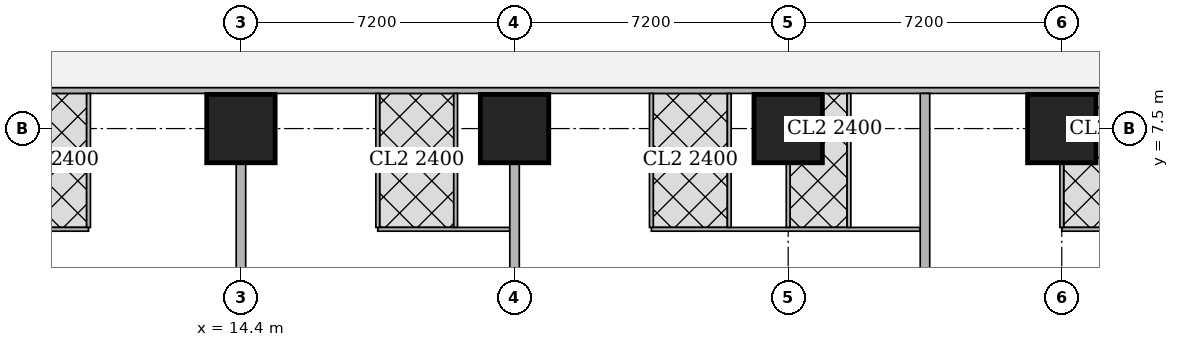
"""IFC4 building model, lengths in metres.
Left out: names, types, materials, properties, quantities, classifications, styles, units other than length and angle.
Written with IfcOpenShell. Run it as: python <this file> out.ifc"""

import sys

from ifc_helpers import new_model, si_unit, direction, frame, frame_2d, origin, origin_2d, place, context, subcontext, project, spatial, rectangle, extrude, element, fill, save


model = new_model("IFC4")
c1 = context("Model", 3, precision=1e-05, world=origin(), true_north=direction((0.0, 1.0)))
c2 = subcontext(c1, "Body", "Model", "MODEL_VIEW")
j1 = project(units=[si_unit("LENGTHUNIT", "METRE"), si_unit("PLANEANGLEUNIT", "RADIAN")], contexts=[c1])
p1 = place(None, origin())
s1 = spatial("IfcSite", under=j1, at=p1, CompositionType="ELEMENT")
p2 = place(p1, origin())
s2 = spatial("IfcBuilding", under=s1, at=p2, CompositionType="ELEMENT")
p3 = place(p2, frame((0.0, 0.0, 20.0)))
s3 = spatial("IfcBuildingStorey", under=s2, at=p3, CompositionType="ELEMENT", Elevation=20.0)
for number, where, z_axis, x_axis in (
    (1, (14.4, 7.5, 0.0), (0.0, 0.0, 1.0), (1.0, 0.0, 0.0)),
    (2, (21.6, 7.5, 0.0), (0.0, 0.0, 1.0), (1.0, 0.0, 0.0)),
    (3, (28.8, 7.5, 0.0), (0.0, 0.0, 1.0), (1.0, 0.0, 0.0)),
    (4, (36.0, 7.5, 0.0), (0.0, 0.0, 1.0), (1.0, 0.0, 0.0)),
):
    element("IfcColumn", number, at=place(p3, frame(where, z_axis=z_axis, x_axis=x_axis)), inside=s3, PredefinedType="COLUMN", context=c2, shape_type="SweptSolid", body=[
        extrude(rectangle(XDim=1.8, YDim=1.8, at=origin_2d()), origin(), (0.0, 0.0, 1.0), 3.75),
    ])
p4 = place(p3, frame((40.054, 8.5, 0.0), z_axis=(0.0, 0.0, 1.0), x_axis=(-1.0, 0.0, 0.0)))
e5 = element("IfcWall", 5, at=p4, inside=s3, PredefinedType="SOLIDWALL", context=c2, shape_type="SweptSolid", body=[
    extrude(rectangle(XDim=31.704, YDim=0.15, at=frame_2d((15.852, 0.0))), origin(), (0.0, 0.0, 1.0), 3.5),
])
p5 = place(p4, frame((27.321, 0.0, 0.0)))
e6 = element("IfcOpeningElement", 6, at=p5, cuts=e5, PredefinedType="OPENING", context=c2, shape_type="SweptSolid", body=[
    extrude(rectangle(XDim=1.0, YDim=2.1, at=frame_2d((0.5, 1.05))), frame((0.0, 0.085, 0.0), z_axis=(0.0, -1.0, 0.0), x_axis=(1.0, 0.0, 0.0)), (0.0, 0.0, 1.0), 0.17),
])
p6 = place(p4, frame((23.054, 0.0, 0.0)))
e7 = element("IfcOpeningElement", 7, at=p6, cuts=e5, PredefinedType="OPENING", context=c2, shape_type="SweptSolid", body=[
    extrude(rectangle(XDim=1.0, YDim=2.1, at=frame_2d((0.5, 1.05))), frame((0.0, 0.085, 0.0), z_axis=(0.0, -1.0, 0.0), x_axis=(1.0, 0.0, 0.0)), (0.0, 0.0, 1.0), 0.17),
])
p7 = place(p4, frame((15.754, 0.0, 0.0)))
e8 = element("IfcOpeningElement", 8, at=p7, cuts=e5, PredefinedType="OPENING", context=c2, shape_type="SweptSolid", body=[
    extrude(rectangle(XDim=1.0, YDim=2.1, at=frame_2d((0.5, 1.05))), frame((0.0, 0.085, 0.0), z_axis=(0.0, -1.0, 0.0), x_axis=(1.0, 0.0, 0.0)), (0.0, 0.0, 1.0), 0.17),
])
p8 = place(p4, frame((5.754, 0.0, 0.0)))
e9 = element("IfcOpeningElement", 9, at=p8, cuts=e5, PredefinedType="OPENING", context=c2, shape_type="SweptSolid", body=[
    extrude(rectangle(XDim=1.0, YDim=2.1, at=frame_2d((0.5, 1.05))), frame((0.0, 0.085, 0.0), z_axis=(0.0, -1.0, 0.0), x_axis=(1.0, 0.0, 0.0)), (0.0, 0.0, 1.0), 0.17),
])
p9 = place(p3, frame((33.755, 42.325, 0.0), z_axis=(0.0, 0.0, 1.0), x_axis=(0.185611461091, -0.982623216453, 0.0)))
e10 = element("IfcWall", 10, at=p9, inside=s3, PredefinedType="SOLIDWALL", context=c2, shape_type="SweptSolid", body=[
    extrude(rectangle(XDim=40.241, YDim=0.15, at=frame_2d((20.121, 0.0))), origin(), (0.0, 0.0, 1.0), 2.5),
])
p10 = place(p9, frame((7.325, 0.0, 0.0)))
e11 = element("IfcOpeningElement", 11, at=p10, cuts=e10, PredefinedType="OPENING", context=c2, shape_type="SweptSolid", body=[
    extrude(rectangle(XDim=1.0, YDim=2.1, at=frame_2d((0.5, 1.05))), frame((0.0, 0.085, 0.0), z_axis=(0.0, -1.0, 0.0), x_axis=(1.0, 0.0, 0.0)), (0.0, 0.0, 1.0), 0.17),
])
p11 = place(p9, frame((11.902, 0.0, 0.0)))
e12 = element("IfcOpeningElement", 12, at=p11, cuts=e10, PredefinedType="OPENING", context=c2, shape_type="SweptSolid", body=[
    extrude(rectangle(XDim=1.0, YDim=2.1, at=frame_2d((0.5, 1.05))), frame((0.0, 0.085, 0.0), z_axis=(0.0, -1.0, 0.0), x_axis=(1.0, 0.0, 0.0)), (0.0, 0.0, 1.0), 0.17),
])
p12 = place(p9, frame((25.718, 0.0, 0.0)))
e13 = element("IfcOpeningElement", 13, at=p12, cuts=e10, PredefinedType="OPENING", context=c2, shape_type="SweptSolid", body=[
    extrude(rectangle(XDim=1.0, YDim=2.1, at=frame_2d((0.5, 1.05))), frame((0.0, 0.085, 0.0), z_axis=(0.0, -1.0, 0.0), x_axis=(1.0, 0.0, 0.0)), (0.0, 0.0, 1.0), 0.17),
])
p13 = place(p9, frame((31.788, 0.0, 0.0)))
e14 = element("IfcOpeningElement", 14, at=p13, cuts=e10, PredefinedType="OPENING", context=c2, shape_type="SweptSolid", body=[
    extrude(rectangle(XDim=1.0, YDim=2.1, at=frame_2d((0.5, 1.05))), frame((0.0, 0.085, 0.0), z_axis=(0.0, -1.0, 0.0), x_axis=(1.0, 0.0, 0.0)), (0.0, 0.0, 1.0), 0.17),
])
p14 = place(p3, frame((10.39, 4.85, 0.0), z_axis=(0.0, 0.0, 1.0), x_axis=(-1.0, 0.0, 0.0)))
e15 = element("IfcWall", 15, at=p14, inside=s3, PredefinedType="PARTITIONING", context=c2, shape_type="SweptSolid", body=[
    extrude(rectangle(XDim=1.815, YDim=0.1, at=frame_2d((0.907, 0.0))), origin(), (0.0, 0.0, 1.0), 3.5),
])
p15 = place(p14, frame((0.49, 0.0, 0.0)))
e16 = element("IfcOpeningElement", 16, at=p15, cuts=e15, PredefinedType="OPENING", context=c2, shape_type="SweptSolid", body=[
    extrude(rectangle(XDim=0.9, YDim=2.1, at=frame_2d((0.45, 1.05))), frame((0.0, 0.06, 0.0), z_axis=(0.0, -1.0, 0.0), x_axis=(1.0, 0.0, 0.0)), (0.0, 0.0, 1.0), 0.12),
])
p16 = place(p3, frame((10.39, 4.9, 0.0), z_axis=(0.0, 0.0, 1.0), x_axis=(0.0, 1.0, 0.0)))
e17 = element("IfcWall", 17, at=p16, inside=s3, PredefinedType="PARTITIONING", context=c2, shape_type="SweptSolid", body=[
    extrude(rectangle(XDim=3.525, YDim=0.1, at=frame_2d((1.763, 0.0))), origin(), (0.0, 0.0, 1.0), 3.5),
])
p17 = place(p3, frame((21.475, 4.85, 0.0), z_axis=(0.0, 0.0, 1.0), x_axis=(-1.0, 0.0, 0.0)))
e18 = element("IfcWall", 18, at=p17, inside=s3, PredefinedType="PARTITIONING", context=c2, shape_type="SweptSolid", body=[
    extrude(rectangle(XDim=3.475, YDim=0.1, at=frame_2d((1.738, 0.0))), origin(), (0.0, 0.0, 1.0), 3.5),
])
p18 = place(p17, frame((2.0, 0.0, 0.0)))
e19 = element("IfcOpeningElement", 19, at=p18, cuts=e18, PredefinedType="OPENING", context=c2, shape_type="SweptSolid", body=[
    extrude(rectangle(XDim=0.9, YDim=2.1, at=frame_2d((0.45, 1.05))), frame((0.0, 0.06, 0.0), z_axis=(0.0, -1.0, 0.0), x_axis=(1.0, 0.0, 0.0)), (0.0, 0.0, 1.0), 0.12),
])
p19 = place(p17, frame((0.2, 0.0, 0.0)))
e20 = element("IfcOpeningElement", 20, at=p19, cuts=e18, PredefinedType="OPENING", context=c2, shape_type="SweptSolid", body=[
    extrude(rectangle(XDim=0.9, YDim=2.1, at=frame_2d((0.45, 1.05))), frame((0.0, 0.06, 0.0), z_axis=(0.0, -1.0, 0.0), x_axis=(1.0, 0.0, 0.0)), (0.0, 0.0, 1.0), 0.12),
])
for number, where, z_axis, x_axis in (
    (21, (18.0, 4.9, 0.0), (0.0, 0.0, 1.0), (0.0, 1.0, 0.0)),
    (22, (20.05, 4.9, 0.0), (0.0, 0.0, 1.0), (0.0, 1.0, 0.0)),
):
    element("IfcWall", number, at=place(p3, frame(where, z_axis=z_axis, x_axis=x_axis)), inside=s3, PredefinedType="PARTITIONING", context=c2, shape_type="SweptSolid", body=[
        extrude(rectangle(XDim=3.525, YDim=0.1, at=frame_2d((1.763, 0.0))), origin(), (0.0, 0.0, 1.0), 3.5),
    ])
p20 = place(p3, frame((14.4, 3.65, 0.0), z_axis=(0.0, 0.0, 1.0), x_axis=(0.0, 1.0, 0.0)))
e23 = element("IfcWall", 23, at=p20, inside=s3, PredefinedType="SOLIDWALL", context=c2, shape_type="SweptSolid", body=[
    extrude(rectangle(XDim=2.949, YDim=0.25, at=frame_2d((1.475, 0.0))), origin(), (0.0, 0.0, 1.0), 3.5),
])
p21 = place(p3, frame((32.275, 4.85, 0.0), z_axis=(0.0, 0.0, 1.0), x_axis=(-1.0, 0.0, 0.0)))
e24 = element("IfcWall", 24, at=p21, inside=s3, PredefinedType="PARTITIONING", context=c2, shape_type="SweptSolid", body=[
    extrude(rectangle(XDim=7.075, YDim=0.1, at=frame_2d((3.538, 0.0))), origin(), (0.0, 0.0, 1.0), 3.5),
])
p22 = place(p21, frame((5.6, 0.0, 0.0)))
e25 = element("IfcOpeningElement", 25, at=p22, cuts=e24, PredefinedType="OPENING", context=c2, shape_type="SweptSolid", body=[
    extrude(rectangle(XDim=0.9, YDim=2.1, at=frame_2d((0.45, 1.05))), frame((0.0, 0.06, 0.0), z_axis=(0.0, -1.0, 0.0), x_axis=(1.0, 0.0, 0.0)), (0.0, 0.0, 1.0), 0.12),
])
p23 = place(p21, frame((2.225, 0.0, 0.0)))
e26 = element("IfcOpeningElement", 26, at=p23, cuts=e24, PredefinedType="OPENING", context=c2, shape_type="SweptSolid", body=[
    extrude(rectangle(XDim=0.9, YDim=2.1, at=frame_2d((0.45, 1.05))), frame((0.0, 0.06, 0.0), z_axis=(0.0, -1.0, 0.0), x_axis=(1.0, 0.0, 0.0)), (0.0, 0.0, 1.0), 0.12),
])
p24 = place(p21, frame((3.8, 0.0, 0.0)))
e27 = element("IfcOpeningElement", 27, at=p24, cuts=e24, PredefinedType="OPENING", context=c2, shape_type="SweptSolid", body=[
    extrude(rectangle(XDim=0.9, YDim=2.1, at=frame_2d((0.45, 1.05))), frame((0.0, 0.06, 0.0), z_axis=(0.0, -1.0, 0.0), x_axis=(1.0, 0.0, 0.0)), (0.0, 0.0, 1.0), 0.12),
])
p25 = place(p21, frame((0.425, 0.0, 0.0)))
e28 = element("IfcOpeningElement", 28, at=p25, cuts=e24, PredefinedType="OPENING", context=c2, shape_type="SweptSolid", body=[
    extrude(rectangle(XDim=0.9, YDim=2.1, at=frame_2d((0.45, 1.05))), frame((0.0, 0.06, 0.0), z_axis=(0.0, -1.0, 0.0), x_axis=(1.0, 0.0, 0.0)), (0.0, 0.0, 1.0), 0.12),
])
p26 = place(p3, frame((25.2, 4.9, 0.0), z_axis=(0.0, 0.0, 1.0), x_axis=(0.0, 1.0, 0.0)))
e29 = element("IfcWall", 29, at=p26, inside=s3, PredefinedType="PARTITIONING", context=c2, shape_type="SweptSolid", body=[
    extrude(rectangle(XDim=3.525, YDim=0.1, at=frame_2d((1.763, 0.0))), origin(), (0.0, 0.0, 1.0), 3.5),
])
p27 = place(p3, frame((28.8, 4.9, 0.0), z_axis=(0.0, 0.0, 1.0), x_axis=(0.0, 1.0, 0.0)))
e30 = element("IfcWall", 30, at=p27, inside=s3, PredefinedType="PARTITIONING", context=c2, shape_type="SweptSolid", body=[
    extrude(rectangle(XDim=1.699, YDim=0.1, at=frame_2d((0.85, 0.0))), origin(), (0.0, 0.0, 1.0), 3.5),
])
for number, where, z_axis, x_axis in (
    (31, (27.25, 4.9, 0.0), (0.0, 0.0, 1.0), (0.0, 1.0, 0.0)),
    (32, (30.4, 4.9, 0.0), (0.0, 0.0, 1.0), (0.0, 1.0, 0.0)),
):
    element("IfcWall", number, at=place(p3, frame(where, z_axis=z_axis, x_axis=x_axis)), inside=s3, PredefinedType="PARTITIONING", context=c2, shape_type="SweptSolid", body=[
        extrude(rectangle(XDim=3.525, YDim=0.1, at=frame_2d((1.763, 0.0))), origin(), (0.0, 0.0, 1.0), 3.5),
    ])
p28 = place(p3, frame((21.6, 3.65, 0.0), z_axis=(0.0, 0.0, 1.0), x_axis=(0.0, 1.0, 0.0)))
e33 = element("IfcWall", 33, at=p28, inside=s3, PredefinedType="SOLIDWALL", context=c2, shape_type="SweptSolid", body=[
    extrude(rectangle(XDim=2.949, YDim=0.25, at=frame_2d((1.475, 0.0))), origin(), (0.0, 0.0, 1.0), 3.5),
])
p29 = place(p3, frame((40.748, 4.85, 0.0), z_axis=(0.0, 0.0, 1.0), x_axis=(-1.0, 0.0, 0.0)))
e34 = element("IfcWall", 34, at=p29, inside=s3, PredefinedType="PARTITIONING", context=c2, shape_type="SweptSolid", body=[
    extrude(rectangle(XDim=4.748, YDim=0.1, at=frame_2d((2.374, 0.0))), origin(), (0.0, 0.0, 1.0), 3.5),
])
p30 = place(p29, frame((3.273, 0.0, 0.0)))
e35 = element("IfcOpeningElement", 35, at=p30, cuts=e34, PredefinedType="OPENING", context=c2, shape_type="SweptSolid", body=[
    extrude(rectangle(XDim=0.9, YDim=2.1, at=frame_2d((0.45, 1.05))), frame((0.0, 0.06, 0.0), z_axis=(0.0, -1.0, 0.0), x_axis=(1.0, 0.0, 0.0)), (0.0, 0.0, 1.0), 0.12),
])
p31 = place(p29, frame((0.15, 0.0, 0.0)))
e36 = element("IfcOpeningElement", 36, at=p31, cuts=e34, PredefinedType="OPENING", context=c2, shape_type="SweptSolid", body=[
    extrude(rectangle(XDim=0.9, YDim=2.1, at=frame_2d((0.45, 1.05))), frame((0.0, 0.06, 0.0), z_axis=(0.0, -1.0, 0.0), x_axis=(1.0, 0.0, 0.0)), (0.0, 0.0, 1.0), 0.12),
])
p32 = place(p29, frame((1.473, 0.0, 0.0)))
e37 = element("IfcOpeningElement", 37, at=p32, cuts=e34, PredefinedType="OPENING", context=c2, shape_type="SweptSolid", body=[
    extrude(rectangle(XDim=0.9, YDim=2.1, at=frame_2d((0.45, 1.05))), frame((0.0, 0.06, 0.0), z_axis=(0.0, -1.0, 0.0), x_axis=(1.0, 0.0, 0.0)), (0.0, 0.0, 1.0), 0.12),
])
p33 = place(p3, frame((36.0, 4.9, 0.0), z_axis=(0.0, 0.0, 1.0), x_axis=(0.0, 1.0, 0.0)))
e38 = element("IfcWall", 38, at=p33, inside=s3, PredefinedType="PARTITIONING", context=c2, shape_type="SweptSolid", body=[
    extrude(rectangle(XDim=1.699, YDim=0.1, at=frame_2d((0.85, 0.0))), origin(), (0.0, 0.0, 1.0), 3.5),
])
p34 = place(p3, frame((32.4, 3.65, 0.0), z_axis=(0.0, 0.0, 1.0), x_axis=(0.0, 1.0, 0.0)))
e39 = element("IfcWall", 39, at=p34, inside=s3, PredefinedType="SOLIDWALL", context=c2, shape_type="SweptSolid", body=[
    extrude(rectangle(XDim=4.775, YDim=0.25, at=frame_2d((2.388, 0.0))), origin(), (0.0, 0.0, 1.0), 3.5),
])
p35 = place(p15, origin())
e40 = element("IfcDoor", 40, at=p35, inside=s3, OperationType="SINGLE_SWING_LEFT", PredefinedType="DOOR", context=c2, shape_type="SweptSolid", body=[
    extrude(rectangle(XDim=0.9, YDim=2.1, at=frame_2d((0.45, 1.05))), frame((0.0, 0.025, 0.0), z_axis=(0.0, -1.0, 0.0), x_axis=(1.0, 0.0, 0.0)), (0.0, 0.0, 1.0), 0.05),
])
fill(e16, e40)
p36 = place(p5, origin())
e41 = element("IfcDoor", 41, at=p36, inside=s3, OperationType="SINGLE_SWING_LEFT", PredefinedType="DOOR", context=c2, shape_type="SweptSolid", body=[
    extrude(rectangle(XDim=1.0, YDim=2.1, at=frame_2d((0.5, 1.05))), frame((0.0, 0.025, 0.0), z_axis=(0.0, -1.0, 0.0), x_axis=(1.0, 0.0, 0.0)), (0.0, 0.0, 1.0), 0.05),
])
fill(e6, e41)
p37 = place(p18, origin())
e42 = element("IfcDoor", 42, at=p37, inside=s3, OperationType="SINGLE_SWING_LEFT", PredefinedType="DOOR", context=c2, shape_type="SweptSolid", body=[
    extrude(rectangle(XDim=0.9, YDim=2.1, at=frame_2d((0.45, 1.05))), frame((0.0, 0.025, 0.0), z_axis=(0.0, -1.0, 0.0), x_axis=(1.0, 0.0, 0.0)), (0.0, 0.0, 1.0), 0.05),
])
fill(e19, e42)
p38 = place(p19, origin())
e43 = element("IfcDoor", 43, at=p38, inside=s3, OperationType="SINGLE_SWING_RIGHT", PredefinedType="DOOR", context=c2, shape_type="SweptSolid", body=[
    extrude(rectangle(XDim=0.9, YDim=2.1, at=frame_2d((0.45, 1.05))), frame((0.0, 0.025, 0.0), z_axis=(0.0, -1.0, 0.0), x_axis=(1.0, 0.0, 0.0)), (0.0, 0.0, 1.0), 0.05),
])
fill(e20, e43)
p39 = place(p6, origin())
e44 = element("IfcDoor", 44, at=p39, inside=s3, OperationType="SINGLE_SWING_LEFT", PredefinedType="DOOR", context=c2, shape_type="SweptSolid", body=[
    extrude(rectangle(XDim=1.0, YDim=2.1, at=frame_2d((0.5, 1.05))), frame((0.0, 0.025, 0.0), z_axis=(0.0, -1.0, 0.0), x_axis=(1.0, 0.0, 0.0)), (0.0, 0.0, 1.0), 0.05),
])
fill(e7, e44)
p40 = place(p22, origin())
e45 = element("IfcDoor", 45, at=p40, inside=s3, OperationType="SINGLE_SWING_LEFT", PredefinedType="DOOR", context=c2, shape_type="SweptSolid", body=[
    extrude(rectangle(XDim=0.9, YDim=2.1, at=frame_2d((0.45, 1.05))), frame((0.0, 0.025, 0.0), z_axis=(0.0, -1.0, 0.0), x_axis=(1.0, 0.0, 0.0)), (0.0, 0.0, 1.0), 0.05),
])
fill(e25, e45)
p41 = place(p23, origin())
e46 = element("IfcDoor", 46, at=p41, inside=s3, OperationType="SINGLE_SWING_RIGHT", PredefinedType="DOOR", context=c2, shape_type="SweptSolid", body=[
    extrude(rectangle(XDim=0.9, YDim=2.1, at=frame_2d((0.45, 1.05))), frame((0.0, 0.025, 0.0), z_axis=(0.0, -1.0, 0.0), x_axis=(1.0, 0.0, 0.0)), (0.0, 0.0, 1.0), 0.05),
])
fill(e26, e46)
p42 = place(p24, origin())
e47 = element("IfcDoor", 47, at=p42, inside=s3, OperationType="SINGLE_SWING_RIGHT", PredefinedType="DOOR", context=c2, shape_type="SweptSolid", body=[
    extrude(rectangle(XDim=0.9, YDim=2.1, at=frame_2d((0.45, 1.05))), frame((0.0, 0.025, 0.0), z_axis=(0.0, -1.0, 0.0), x_axis=(1.0, 0.0, 0.0)), (0.0, 0.0, 1.0), 0.05),
])
fill(e27, e47)
p43 = place(p25, origin())
e48 = element("IfcDoor", 48, at=p43, inside=s3, OperationType="SINGLE_SWING_RIGHT", PredefinedType="DOOR", context=c2, shape_type="SweptSolid", body=[
    extrude(rectangle(XDim=0.9, YDim=2.1, at=frame_2d((0.45, 1.05))), frame((0.0, 0.025, 0.0), z_axis=(0.0, -1.0, 0.0), x_axis=(1.0, 0.0, 0.0)), (0.0, 0.0, 1.0), 0.05),
])
fill(e28, e48)
p44 = place(p7, origin())
e49 = element("IfcDoor", 49, at=p44, inside=s3, OperationType="SINGLE_SWING_LEFT", PredefinedType="DOOR", context=c2, shape_type="SweptSolid", body=[
    extrude(rectangle(XDim=1.0, YDim=2.1, at=frame_2d((0.5, 1.05))), frame((0.0, 0.025, 0.0), z_axis=(0.0, -1.0, 0.0), x_axis=(1.0, 0.0, 0.0)), (0.0, 0.0, 1.0), 0.05),
])
fill(e8, e49)
p45 = place(p30, origin())
e50 = element("IfcDoor", 50, at=p45, inside=s3, OperationType="SINGLE_SWING_LEFT", PredefinedType="DOOR", context=c2, shape_type="SweptSolid", body=[
    extrude(rectangle(XDim=0.9, YDim=2.1, at=frame_2d((0.45, 1.05))), frame((0.0, 0.025, 0.0), z_axis=(0.0, -1.0, 0.0), x_axis=(1.0, 0.0, 0.0)), (0.0, 0.0, 1.0), 0.05),
])
fill(e35, e50)
p46 = place(p8, origin())
e51 = element("IfcDoor", 51, at=p46, inside=s3, OperationType="SINGLE_SWING_RIGHT", PredefinedType="DOOR", context=c2, shape_type="SweptSolid", body=[
    extrude(rectangle(XDim=1.0, YDim=2.1, at=frame_2d((0.5, 1.05))), frame((0.0, 0.025, 0.0), z_axis=(0.0, -1.0, 0.0), x_axis=(1.0, 0.0, 0.0)), (0.0, 0.0, 1.0), 0.05),
])
fill(e9, e51)
save(model, sys.argv[1])
